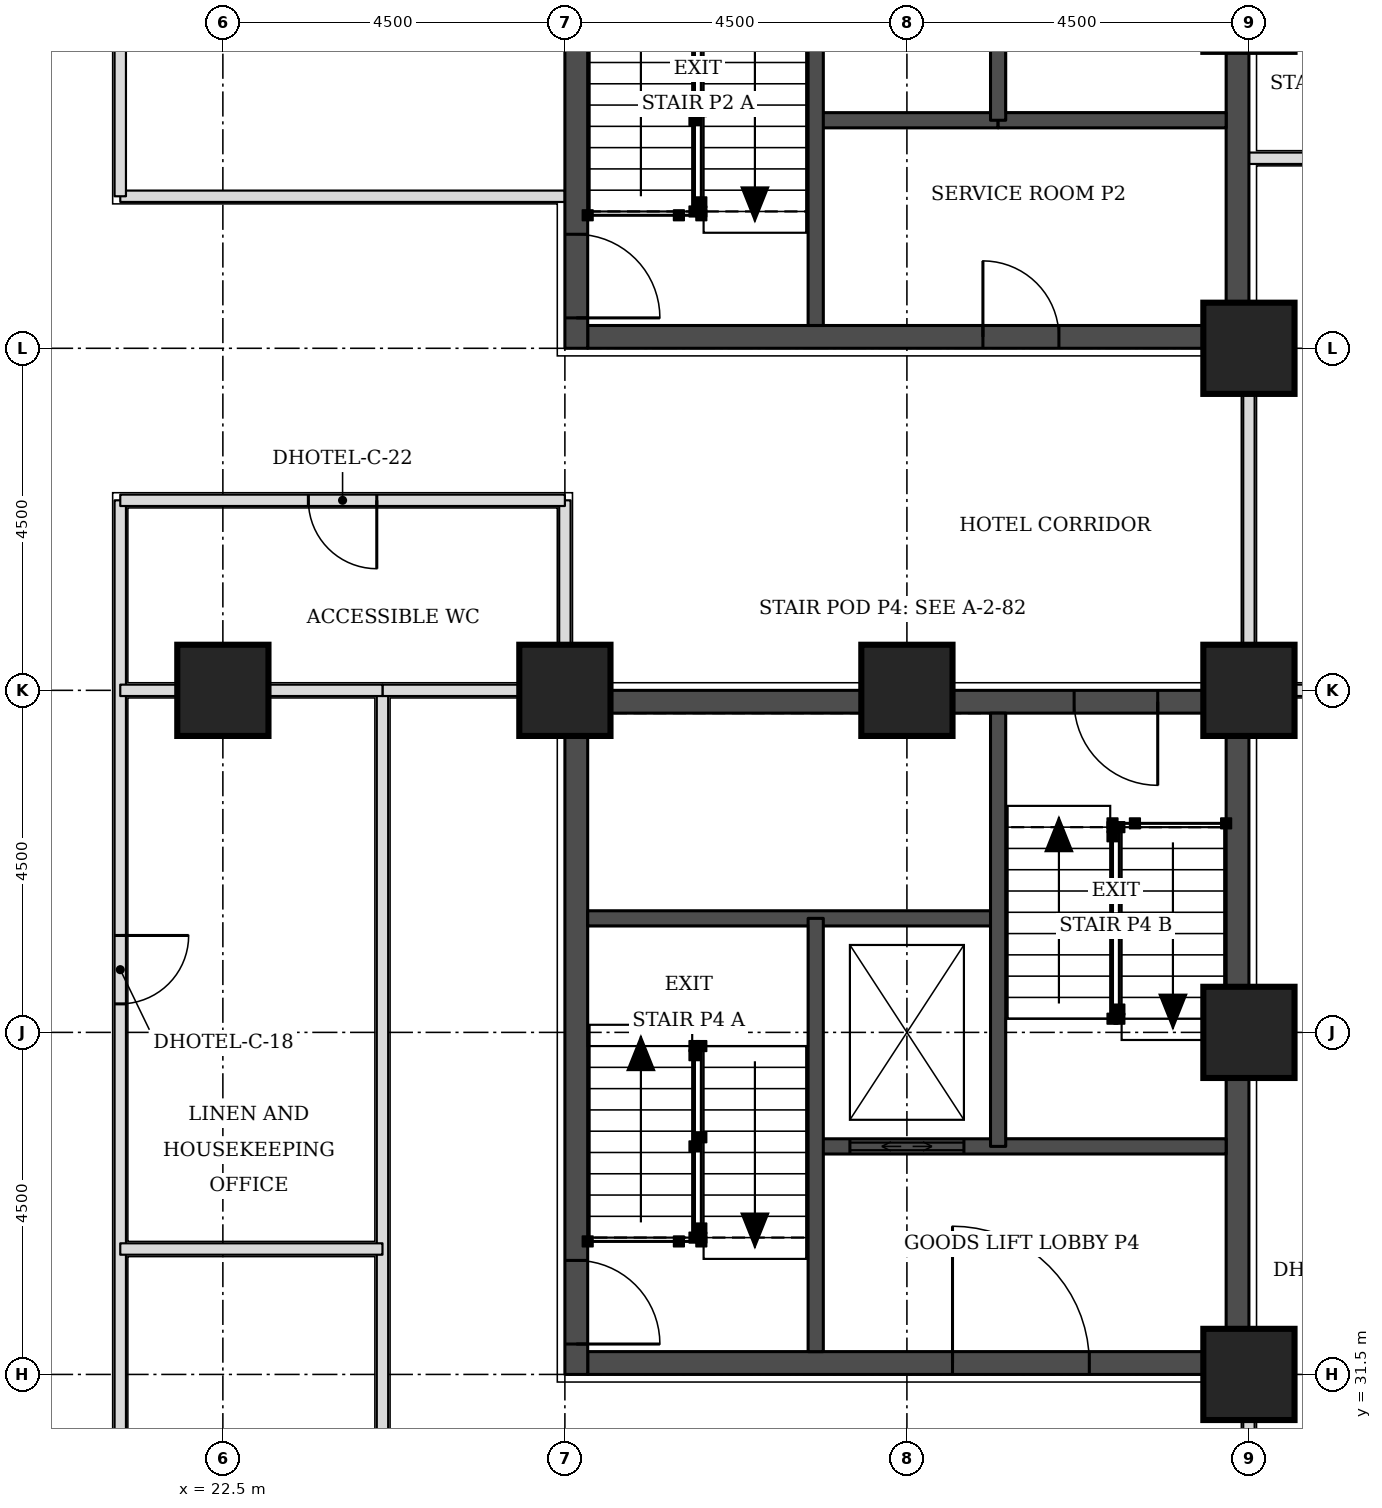
"""IFC4 building model, lengths in metres.
Left out: names, types, materials, properties, quantities, classifications, styles, units other than length and angle.
Written with IfcOpenShell. Run it as: python <this file> out.ifc"""

import sys

from ifc_helpers import new_model, si_unit, direction, frame, frame_2d, origin, origin_2d, place, context, subcontext, project, spatial, rectangle, extrude, element, fill, save


model = new_model("IFC4")
c1 = context("Model", 3, precision=1e-05, world=origin(), true_north=direction((0.0, 1.0)))
c2 = subcontext(c1, "Body", "Model", "MODEL_VIEW")
j1 = project(units=[si_unit("LENGTHUNIT", "METRE"), si_unit("PLANEANGLEUNIT", "RADIAN")], contexts=[c1])
p1 = place(None, origin())
s1 = spatial("IfcSite", under=j1, at=p1, CompositionType="ELEMENT")
p2 = place(p1, origin())
s2 = spatial("IfcBuilding", under=s1, at=p2, CompositionType="ELEMENT")
p3 = place(p2, frame((0.0, 0.0, 56.1)))
s3 = spatial("IfcBuildingStorey", under=s2, at=p3, CompositionType="ELEMENT", Elevation=56.1)
for number, where, z_axis, x_axis in (
    (1, (36.0, 31.5, 0.0), (0.0, 0.0, 1.0), (1.0, 0.0, 0.0)),
    (2, (36.0, 36.0, 0.0), (0.0, 0.0, 1.0), (1.0, 0.0, 0.0)),
    (3, (22.5, 40.5, 0.0), (0.0, 0.0, 1.0), (1.0, 0.0, 0.0)),
    (4, (27.0, 40.5, 0.0), (0.0, 0.0, 1.0), (1.0, 0.0, 0.0)),
    (5, (31.5, 40.5, 0.0), (0.0, 0.0, 1.0), (1.0, 0.0, 0.0)),
    (6, (36.0, 40.5, 0.0), (0.0, 0.0, 1.0), (1.0, 0.0, 0.0)),
    (7, (36.0, 45.0, 0.0), (0.0, 0.0, 1.0), (1.0, 0.0, 0.0)),
):
    element("IfcColumn", number, at=place(p3, frame(where, z_axis=z_axis, x_axis=x_axis)), inside=s3, PredefinedType="COLUMN", context=c2, shape_type="SweptSolid", body=[
        extrude(rectangle(XDim=1.2, YDim=1.2, at=origin_2d()), origin(), (0.0, 0.0, 1.0), 3.3),
    ])
p4 = place(p3, frame((27.3, 45.15, 0.0), z_axis=(0.0, 0.0, 1.0), x_axis=(1.0, 0.0, 0.0)))
e8 = element("IfcWall", 8, at=p4, inside=s3, PredefinedType="SHEAR", context=c2, shape_type="SweptSolid", body=[
    extrude(rectangle(XDim=8.4, YDim=0.3, at=frame_2d((4.2, 0.0))), origin(), (0.0, 0.0, 1.0), 3.3),
])
p5 = place(p4, frame((5.2, 0.0, 0.0)))
e9 = element("IfcOpeningElement", 9, at=p5, cuts=e8, PredefinedType="OPENING", context=c2, shape_type="SweptSolid", body=[
    extrude(rectangle(XDim=1.0, YDim=2.1, at=frame_2d((0.5, 1.05))), frame((0.0, 0.16, 0.0), z_axis=(0.0, -1.0, 0.0), x_axis=(1.0, 0.0, 0.0)), (0.0, 0.0, 1.0), 0.32),
])
p6 = place(p3, frame((27.15, 45.0, 0.0), z_axis=(0.0, 0.0, 1.0), x_axis=(0.0, 1.0, 0.0)))
e10 = element("IfcWall", 10, at=p6, inside=s3, PredefinedType="SHEAR", context=c2, shape_type="SweptSolid", body=[
    extrude(rectangle(XDim=9.0, YDim=0.3, at=frame_2d((4.5, 0.0))), origin(), (0.0, 0.0, 1.0), 3.3),
])
p7 = place(p6, frame((0.4, 0.0, 0.0)))
e11 = element("IfcOpeningElement", 11, at=p7, cuts=e10, PredefinedType="OPENING", context=c2, shape_type="SweptSolid", body=[
    extrude(rectangle(XDim=1.1, YDim=2.1, at=frame_2d((0.55, 1.05))), frame((0.0, 0.16, 0.0), z_axis=(0.0, -1.0, 0.0), x_axis=(1.0, 0.0, 0.0)), (0.0, 0.0, 1.0), 0.32),
])
p8 = place(p3, frame((35.85, 45.0, 0.0), z_axis=(0.0, 0.0, 1.0), x_axis=(0.0, 1.0, 0.0)))
e12 = element("IfcWall", 12, at=p8, inside=s3, PredefinedType="SHEAR", context=c2, shape_type="SweptSolid", body=[
    extrude(rectangle(XDim=9.0, YDim=0.3, at=frame_2d((4.5, 0.0))), origin(), (0.0, 0.0, 1.0), 3.3),
])
p9 = place(p3, frame((27.3, 31.65, 0.0), z_axis=(0.0, 0.0, 1.0), x_axis=(1.0, 0.0, 0.0)))
e13 = element("IfcWall", 13, at=p9, inside=s3, PredefinedType="SHEAR", context=c2, shape_type="SweptSolid", body=[
    extrude(rectangle(XDim=8.4, YDim=0.3, at=frame_2d((4.2, 0.0))), origin(), (0.0, 0.0, 1.0), 3.3),
])
p10 = place(p9, frame((4.8, 0.0, 0.0)))
e14 = element("IfcOpeningElement", 14, at=p10, cuts=e13, PredefinedType="OPENING", context=c2, shape_type="SweptSolid", body=[
    extrude(rectangle(XDim=1.8, YDim=2.1, at=frame_2d((0.9, 1.05))), frame((0.0, 0.16, 0.0), z_axis=(0.0, -1.0, 0.0), x_axis=(1.0, 0.0, 0.0)), (0.0, 0.0, 1.0), 0.32),
])
p11 = place(p3, frame((27.3, 40.35, 0.0), z_axis=(0.0, 0.0, 1.0), x_axis=(1.0, 0.0, 0.0)))
e15 = element("IfcWall", 15, at=p11, inside=s3, PredefinedType="SHEAR", context=c2, shape_type="SweptSolid", body=[
    extrude(rectangle(XDim=8.4, YDim=0.3, at=frame_2d((4.2, 0.0))), origin(), (0.0, 0.0, 1.0), 3.3),
])
p12 = place(p11, frame((6.4, 0.0, 0.0)))
e16 = element("IfcOpeningElement", 16, at=p12, cuts=e15, PredefinedType="OPENING", context=c2, shape_type="SweptSolid", body=[
    extrude(rectangle(XDim=1.1, YDim=2.1, at=frame_2d((0.55, 1.05))), frame((0.0, 0.16, 0.0), z_axis=(0.0, -1.0, 0.0), x_axis=(1.0, 0.0, 0.0)), (0.0, 0.0, 1.0), 0.32),
])
p13 = place(p3, frame((27.15, 31.5, 0.0), z_axis=(0.0, 0.0, 1.0), x_axis=(0.0, 1.0, 0.0)))
e17 = element("IfcWall", 17, at=p13, inside=s3, PredefinedType="SHEAR", context=c2, shape_type="SweptSolid", body=[
    extrude(rectangle(XDim=9.0, YDim=0.3, at=frame_2d((4.5, 0.0))), origin(), (0.0, 0.0, 1.0), 3.3),
])
p14 = place(p13, frame((0.4, 0.0, 0.0)))
e18 = element("IfcOpeningElement", 18, at=p14, cuts=e17, PredefinedType="OPENING", context=c2, shape_type="SweptSolid", body=[
    extrude(rectangle(XDim=1.1, YDim=2.1, at=frame_2d((0.55, 1.05))), frame((0.0, 0.16, 0.0), z_axis=(0.0, -1.0, 0.0), x_axis=(1.0, 0.0, 0.0)), (0.0, 0.0, 1.0), 0.32),
])
p15 = place(p3, frame((35.85, 31.5, 0.0), z_axis=(0.0, 0.0, 1.0), x_axis=(0.0, 1.0, 0.0)))
e19 = element("IfcWall", 19, at=p15, inside=s3, PredefinedType="SHEAR", context=c2, shape_type="SweptSolid", body=[
    extrude(rectangle(XDim=9.0, YDim=0.3, at=frame_2d((4.5, 0.0))), origin(), (0.0, 0.0, 1.0), 3.3),
])
p16 = place(p3, frame((21.15, 27.15, 0.0), z_axis=(0.0, 0.0, 1.0), x_axis=(0.0, 1.0, 0.0)))
e20 = element("IfcWall", 20, at=p16, inside=s3, PredefinedType="PARTITIONING", context=c2, shape_type="SweptSolid", body=[
    extrude(rectangle(XDim=15.85, YDim=0.15, at=frame_2d((7.925, 0.0))), origin(), (0.0, 0.0, 1.0), 3.08),
])
p17 = place(p16, frame((2.55, 0.0, 0.0)))
e21 = element("IfcOpeningElement", 21, at=p17, cuts=e20, PredefinedType="OPENING", context=c2, shape_type="SweptSolid", body=[
    extrude(rectangle(XDim=0.9, YDim=2.1, at=frame_2d((0.45, 1.05))), frame((0.0, 0.085, 0.0), z_axis=(0.0, -1.0, 0.0), x_axis=(1.0, 0.0, 0.0)), (0.0, 0.0, 1.0), 0.17),
])
p18 = place(p16, frame((9.225, 0.0, 0.0)))
e22 = element("IfcOpeningElement", 22, at=p18, cuts=e20, PredefinedType="OPENING", context=c2, shape_type="SweptSolid", body=[
    extrude(rectangle(XDim=0.9, YDim=2.1, at=frame_2d((0.45, 1.05))), frame((0.0, 0.085, 0.0), z_axis=(0.0, -1.0, 0.0), x_axis=(1.0, 0.0, 0.0)), (0.0, 0.0, 1.0), 0.17),
])
p19 = place(p3, frame((24.6, 27.15, 0.0), z_axis=(0.0, 0.0, 1.0), x_axis=(0.0, 1.0, 0.0)))
e23 = element("IfcWall", 23, at=p19, inside=s3, PredefinedType="PARTITIONING", context=c2, shape_type="SweptSolid", body=[
    extrude(rectangle(XDim=13.35, YDim=0.15, at=frame_2d((6.675, 0.0))), origin(), (0.0, 0.0, 1.0), 3.08),
])
p20 = place(p3, frame((36.0, 29.5, 0.0), z_axis=(0.0, 0.0, 1.0), x_axis=(0.0, 1.0, 0.0)))
e24 = element("IfcWall", 24, at=p20, inside=s3, PredefinedType="PARTITIONING", context=c2, shape_type="SweptSolid", body=[
    extrude(rectangle(XDim=1.95, YDim=0.15, at=frame_2d((0.975, 0.0))), origin(), (0.0, 0.0, 1.0), 2.33),
])
p21 = place(p3, frame((24.6, 40.5, 0.0), z_axis=(0.0, 0.0, 1.0), x_axis=(1.0, 0.0, 0.0)))
e25 = element("IfcWall", 25, at=p21, inside=s3, PredefinedType="PARTITIONING", context=c2, shape_type="SweptSolid", body=[
    extrude(rectangle(XDim=2.35, YDim=0.15, at=frame_2d((1.175, 0.0))), origin(), (0.0, 0.0, 1.0), 2.33),
])
p22 = place(p3, frame((27.0, 40.55, 0.0), z_axis=(0.0, 0.0, 1.0), x_axis=(0.0, 1.0, 0.0)))
e26 = element("IfcWall", 26, at=p22, inside=s3, PredefinedType="PARTITIONING", context=c2, shape_type="SweptSolid", body=[
    extrude(rectangle(XDim=2.45, YDim=0.15, at=frame_2d((1.225, 0.0))), origin(), (0.0, 0.0, 1.0), 3.08),
])
p23 = place(p3, frame((36.0, 40.55, 0.0), z_axis=(0.0, 0.0, 1.0), x_axis=(0.0, 1.0, 0.0)))
e27 = element("IfcWall", 27, at=p23, inside=s3, PredefinedType="PARTITIONING", context=c2, shape_type="SweptSolid", body=[
    extrude(rectangle(XDim=4.4, YDim=0.15, at=frame_2d((2.2, 0.0))), origin(), (0.0, 0.0, 1.0), 2.33),
])
p24 = place(p3, frame((21.15, 43.0, 0.0), z_axis=(0.0, 0.0, 1.0), x_axis=(1.0, 0.0, 0.0)))
e28 = element("IfcWall", 28, at=p24, inside=s3, PredefinedType="PARTITIONING", context=c2, shape_type="SweptSolid", body=[
    extrude(rectangle(XDim=5.85, YDim=0.15, at=frame_2d((2.925, 0.0))), origin(), (0.0, 0.0, 1.0), 3.08),
])
p25 = place(p24, frame((2.475, 0.0, 0.0)))
e29 = element("IfcOpeningElement", 29, at=p25, cuts=e28, PredefinedType="OPENING", context=c2, shape_type="SweptSolid", body=[
    extrude(rectangle(XDim=0.9, YDim=2.1, at=frame_2d((0.45, 1.05))), frame((0.0, 0.085, 0.0), z_axis=(0.0, -1.0, 0.0), x_axis=(1.0, 0.0, 0.0)), (0.0, 0.0, 1.0), 0.17),
])
p26 = place(p3, frame((21.15, 47.0, 0.0), z_axis=(0.0, 0.0, 1.0), x_axis=(1.0, 0.0, 0.0)))
e30 = element("IfcWall", 30, at=p26, inside=s3, PredefinedType="PARTITIONING", context=c2, shape_type="SweptSolid", body=[
    extrude(rectangle(XDim=5.85, YDim=0.15, at=frame_2d((2.925, 0.0))), origin(), (0.0, 0.0, 1.0), 3.08),
])
p27 = place(p3, frame((21.15, 47.0, 0.0), z_axis=(0.0, 0.0, 1.0), x_axis=(0.0, 1.0, 0.0)))
e31 = element("IfcWall", 31, at=p27, inside=s3, PredefinedType="PARTITIONING", context=c2, shape_type="SweptSolid", body=[
    extrude(rectangle(XDim=2.5, YDim=0.15, at=frame_2d((1.25, 0.0))), origin(), (0.0, 0.0, 1.0), 3.08),
])
p28 = place(p3, frame((21.15, 33.15, 0.0), z_axis=(0.0, 0.0, 1.0), x_axis=(1.0, 0.0, 0.0)))
e32 = element("IfcWall", 32, at=p28, inside=s3, PredefinedType="PARTITIONING", context=c2, shape_type="SweptSolid", body=[
    extrude(rectangle(XDim=3.45, YDim=0.15, at=frame_2d((1.725, 0.0))), origin(), (0.0, 0.0, 1.0), 3.08),
])
p29 = place(p3, frame((21.15, 40.5, 0.0), z_axis=(0.0, 0.0, 1.0), x_axis=(1.0, 0.0, 0.0)))
e33 = element("IfcWall", 33, at=p29, inside=s3, PredefinedType="PARTITIONING", context=c2, shape_type="SweptSolid", body=[
    extrude(rectangle(XDim=3.45, YDim=0.15, at=frame_2d((1.725, 0.0))), origin(), (0.0, 0.0, 1.0), 2.33),
])
p30 = place(p3, frame((36.05, 40.5, 0.0), z_axis=(0.0, 0.0, 1.0), x_axis=(1.0, 0.0, 0.0)))
e34 = element("IfcWall", 34, at=p30, inside=s3, PredefinedType="PARTITIONING", context=c2, shape_type="SweptSolid", body=[
    extrude(rectangle(XDim=2.45, YDim=0.15, at=frame_2d((1.225, 0.0))), origin(), (0.0, 0.0, 1.0), 2.33),
])
p31 = place(p3, frame((36.0, 47.5, 0.0), z_axis=(0.0, 0.0, 1.0), x_axis=(1.0, 0.0, 0.0)))
e35 = element("IfcWall", 35, at=p31, inside=s3, PredefinedType="PARTITIONING", context=c2, shape_type="SweptSolid", body=[
    extrude(rectangle(XDim=7.0, YDim=0.15, at=frame_2d((3.5, 0.0))), origin(), (0.0, 0.0, 1.0), 3.08),
])
p32 = place(p3, frame((30.3, 48.0, 0.0), z_axis=(0.0, 0.0, 1.0), x_axis=(1.0, 0.0, 0.0)))
e36 = element("IfcWall", 36, at=p32, inside=s3, PredefinedType="SOLIDWALL", context=c2, shape_type="SweptSolid", body=[
    extrude(rectangle(XDim=2.4, YDim=0.2, at=frame_2d((1.2, 0.0))), origin(), (0.0, 0.0, 1.0), 3.08),
])
p33 = place(p3, frame((32.7, 48.0, 0.0), z_axis=(0.0, 0.0, 1.0), x_axis=(1.0, 0.0, 0.0)))
e37 = element("IfcWall", 37, at=p33, inside=s3, PredefinedType="SOLIDWALL", context=c2, shape_type="SweptSolid", body=[
    extrude(rectangle(XDim=3.0, YDim=0.2, at=frame_2d((1.5, 0.0))), origin(), (0.0, 0.0, 1.0), 3.08),
])
for number, where, z_axis, x_axis in (
    (38, (30.3, 45.3, 0.0), (0.0, 0.0, 1.0), (0.0, 1.0, 0.0)),
    (39, (32.7, 48.0, 0.0), (0.0, 0.0, 1.0), (0.0, 1.0, 0.0)),
):
    element("IfcWall", number, at=place(p3, frame(where, z_axis=z_axis, x_axis=x_axis)), inside=s3, PredefinedType="SOLIDWALL", context=c2, shape_type="SweptSolid", body=[
        extrude(rectangle(XDim=5.7, YDim=0.2, at=frame_2d((2.85, 0.0))), origin(), (0.0, 0.0, 1.0), 3.08),
    ])
p34 = place(p3, frame((30.3, 34.5, 0.0), z_axis=(0.0, 0.0, 1.0), x_axis=(1.0, 0.0, 0.0)))
e40 = element("IfcWall", 40, at=p34, inside=s3, PredefinedType="SOLIDWALL", context=c2, shape_type="SweptSolid", body=[
    extrude(rectangle(XDim=5.4, YDim=0.2, at=frame_2d((2.7, 0.0))), origin(), (0.0, 0.0, 1.0), 3.08),
])
p35 = place(p34, frame((0.45, 0.0, 0.0)))
e41 = element("IfcOpeningElement", 41, at=p35, cuts=e40, PredefinedType="OPENING", context=c2, shape_type="SweptSolid", body=[
    extrude(rectangle(XDim=1.5, YDim=2.1, at=frame_2d((0.75, 1.05))), frame((0.0, 0.11, 0.0), z_axis=(0.0, -1.0, 0.0), x_axis=(1.0, 0.0, 0.0)), (0.0, 0.0, 1.0), 0.22),
])
p36 = place(p3, frame((27.3, 37.5, 0.0), z_axis=(0.0, 0.0, 1.0), x_axis=(1.0, 0.0, 0.0)))
e42 = element("IfcWall", 42, at=p36, inside=s3, PredefinedType="SOLIDWALL", context=c2, shape_type="SweptSolid", body=[
    extrude(rectangle(XDim=5.4, YDim=0.2, at=frame_2d((2.7, 0.0))), origin(), (0.0, 0.0, 1.0), 3.08),
])
for number, where, z_axis, x_axis in (
    (43, (30.3, 31.8, 0.0), (0.0, 0.0, 1.0), (0.0, 1.0, 0.0)),
    (44, (32.7, 34.5, 0.0), (0.0, 0.0, 1.0), (0.0, 1.0, 0.0)),
):
    element("IfcWall", number, at=place(p3, frame(where, z_axis=z_axis, x_axis=x_axis)), inside=s3, PredefinedType="SOLIDWALL", context=c2, shape_type="SweptSolid", body=[
        extrude(rectangle(XDim=5.7, YDim=0.2, at=frame_2d((2.85, 0.0))), origin(), (0.0, 0.0, 1.0), 3.08),
    ])
p37 = place(p18, frame((0.9, 0.0, 0.0), z_axis=(0.0, 0.0, 1.0), x_axis=(-1.0, 0.0, 0.0)))
e45 = element("IfcDoor", 45, at=p37, inside=s3, OperationType="SINGLE_SWING_LEFT", PredefinedType="DOOR", context=c2, shape_type="SweptSolid", body=[
    extrude(rectangle(XDim=0.9, YDim=2.1, at=frame_2d((0.45, 1.05))), frame((0.0, 0.025, 0.0), z_axis=(0.0, -1.0, 0.0), x_axis=(1.0, 0.0, 0.0)), (0.0, 0.0, 1.0), 0.05),
])
fill(e22, e45)
p38 = place(p25, frame((0.9, 0.0, 0.0), z_axis=(0.0, 0.0, 1.0), x_axis=(-1.0, 0.0, 0.0)))
e46 = element("IfcDoor", 46, at=p38, inside=s3, OperationType="SINGLE_SWING_LEFT", PredefinedType="DOOR", context=c2, shape_type="SweptSolid", body=[
    extrude(rectangle(XDim=0.9, YDim=2.1, at=frame_2d((0.45, 1.05))), frame((0.0, 0.025, 0.0), z_axis=(0.0, -1.0, 0.0), x_axis=(1.0, 0.0, 0.0)), (0.0, 0.0, 1.0), 0.05),
])
fill(e29, e46)
p39 = place(p7, frame((1.1, 0.0, 0.0), z_axis=(0.0, 0.0, 1.0), x_axis=(-1.0, 0.0, 0.0)))
e47 = element("IfcDoor", 47, at=p39, inside=s3, OperationType="SINGLE_SWING_RIGHT", PredefinedType="DOOR", context=c2, shape_type="SweptSolid", body=[
    extrude(rectangle(XDim=1.1, YDim=2.1, at=frame_2d((0.55, 1.05))), frame((0.0, 0.025, 0.0), z_axis=(0.0, -1.0, 0.0), x_axis=(1.0, 0.0, 0.0)), (0.0, 0.0, 1.0), 0.05),
])
fill(e11, e47)
p40 = place(p5, origin())
e48 = element("IfcDoor", 48, at=p40, inside=s3, OperationType="SINGLE_SWING_LEFT", PredefinedType="DOOR", context=c2, shape_type="SweptSolid", body=[
    extrude(rectangle(XDim=1.0, YDim=2.1, at=frame_2d((0.5, 1.05))), frame((0.0, 0.025, 0.0), z_axis=(0.0, -1.0, 0.0), x_axis=(1.0, 0.0, 0.0)), (0.0, 0.0, 1.0), 0.05),
])
fill(e9, e48)
p41 = place(p14, frame((1.1, 0.0, 0.0), z_axis=(0.0, 0.0, 1.0), x_axis=(-1.0, 0.0, 0.0)))
e49 = element("IfcDoor", 49, at=p41, inside=s3, OperationType="SINGLE_SWING_RIGHT", PredefinedType="DOOR", context=c2, shape_type="SweptSolid", body=[
    extrude(rectangle(XDim=1.1, YDim=2.1, at=frame_2d((0.55, 1.05))), frame((0.0, 0.025, 0.0), z_axis=(0.0, -1.0, 0.0), x_axis=(1.0, 0.0, 0.0)), (0.0, 0.0, 1.0), 0.05),
])
fill(e18, e49)
p42 = place(p12, frame((1.1, 0.0, 0.0), z_axis=(0.0, 0.0, 1.0), x_axis=(-1.0, 0.0, 0.0)))
e50 = element("IfcDoor", 50, at=p42, inside=s3, OperationType="SINGLE_SWING_LEFT", PredefinedType="DOOR", context=c2, shape_type="SweptSolid", body=[
    extrude(rectangle(XDim=1.1, YDim=2.1, at=frame_2d((0.55, 1.05))), frame((0.0, 0.025, 0.0), z_axis=(0.0, -1.0, 0.0), x_axis=(1.0, 0.0, 0.0)), (0.0, 0.0, 1.0), 0.05),
])
fill(e16, e50)
p43 = place(p35, origin())
e51 = element("IfcDoor", 51, at=p43, inside=s3, OperationType="DOUBLE_DOOR_SLIDING", PredefinedType="DOOR", context=c2, shape_type="SweptSolid", body=[
    extrude(rectangle(XDim=1.5, YDim=2.1, at=frame_2d((0.75, 1.05))), frame((0.0, 0.025, 0.0), z_axis=(0.0, -1.0, 0.0), x_axis=(1.0, 0.0, 0.0)), (0.0, 0.0, 1.0), 0.05),
])
fill(e41, e51)
p44 = place(p10, origin())
e52 = element("IfcDoor", 52, at=p44, inside=s3, OperationType="SINGLE_SWING_LEFT", PredefinedType="DOOR", context=c2, shape_type="SweptSolid", body=[
    extrude(rectangle(XDim=1.8, YDim=2.1, at=frame_2d((0.9, 1.05))), frame((0.0, 0.025, 0.0), z_axis=(0.0, -1.0, 0.0), x_axis=(1.0, 0.0, 0.0)), (0.0, 0.0, 1.0), 0.05),
])
fill(e14, e52)
save(model, sys.argv[1])
